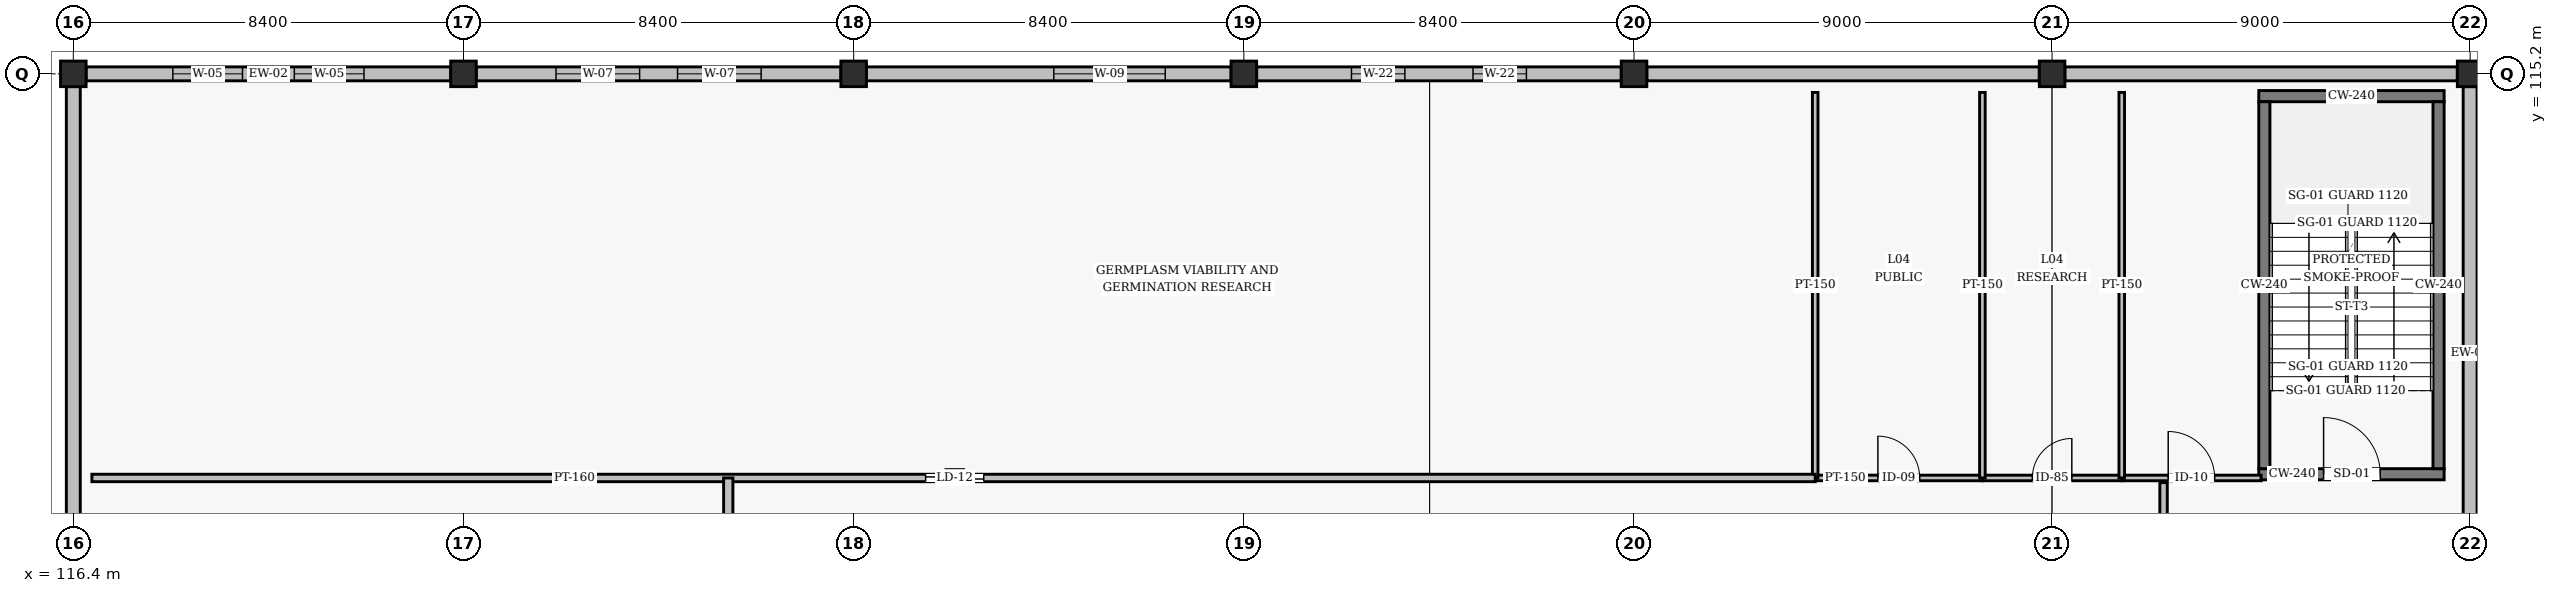
"""IFC4 building model, lengths in metres.
Left out: names, types, materials, properties, quantities, classifications, styles, units other than length and angle.
Written with IfcOpenShell. Run it as: python <this file> out.ifc"""

import sys

from ifc_helpers import new_model, si_unit, direction, frame, frame_2d, origin, origin_2d, place, context, subcontext, project, spatial, rectangle, hollow_rectangle, extrude, element, fill, save


model = new_model("IFC4")
c1 = context("Model", 3, precision=1e-05, world=origin(), true_north=direction((0.0, 1.0)))
c2 = subcontext(c1, "Body", "Model", "MODEL_VIEW")
j1 = project(units=[si_unit("LENGTHUNIT", "METRE"), si_unit("PLANEANGLEUNIT", "RADIAN")], contexts=[c1])
p1 = place(None, origin())
s1 = spatial("IfcSite", under=j1, at=p1, CompositionType="ELEMENT")
p2 = place(p1, origin())
s2 = spatial("IfcBuilding", under=s1, at=p2, CompositionType="ELEMENT")
p3 = place(p2, frame((0.0, 0.0, 17.1)))
s3 = spatial("IfcBuildingStorey", under=s2, at=p3, CompositionType="ELEMENT", Elevation=17.1)
p4 = place(p3, frame((116.4, 115.2, 0.0), z_axis=(0.0, 0.0, 1.0), x_axis=(1.0, 0.0, 0.0)))
e1 = element("IfcColumn", 1, at=p4, inside=s3, PredefinedType="COLUMN", context=c2, shape_type="SweptSolid", body=[
    extrude(hollow_rectangle(XDim=0.55, YDim=0.55, WallThickness=0.022, InnerFilletRadius=0.022, OuterFilletRadius=0.044, at=origin_2d()), origin(), (0.0, 0.0, 1.0), 3.876),
])
for number, where, z_axis, x_axis in (
    (2, (124.8, 115.2, 0.0), (0.0, 0.0, 1.0), (1.0, 0.0, 0.0)),
    (3, (133.2, 115.2, 0.0), (0.0, 0.0, 1.0), (1.0, 0.0, 0.0)),
    (4, (141.6, 115.2, 0.0), (0.0, 0.0, 1.0), (1.0, 0.0, 0.0)),
    (5, (150.0, 115.2, 0.0), (0.0, 0.0, 1.0), (1.0, 0.0, 0.0)),
    (6, (159.0, 115.2, 0.0), (0.0, 0.0, 1.0), (1.0, 0.0, 0.0)),
    (7, (168.0, 115.2, 0.0), (0.0, 0.0, 1.0), (1.0, 0.0, 0.0)),
):
    element("IfcColumn", number, at=place(p3, frame(where, z_axis=z_axis, x_axis=x_axis)), inside=s3, PredefinedType="COLUMN", context=c2, shape_type="SweptSolid", body=[
        extrude(hollow_rectangle(XDim=0.55, YDim=0.55, WallThickness=0.022, InnerFilletRadius=0.022, OuterFilletRadius=0.044, at=origin_2d()), origin(), (0.0, 0.0, 1.0), 3.9),
    ])
p5 = place(p3, frame((168.0, 103.475, 0.0), z_axis=(0.0, 0.0, 1.0), x_axis=(0.0, 1.0, 0.0)))
e8 = element("IfcWall", 8, at=p5, inside=s3, PredefinedType="SOLIDWALL", context=c2, shape_type="SweptSolid", body=[
    extrude(rectangle(XDim=11.45, YDim=0.3, at=frame_2d((5.725, 0.0))), origin(), (0.0, 0.0, 1.0), 2.808),
])
for number, where, z_axis, x_axis in (
    (9, (167.725, 115.2, 0.0), (0.0, 0.0, 1.0), (-1.0, 0.0, 0.0)),
    (10, (158.725, 115.2, 0.0), (0.0, 0.0, 1.0), (-1.0, 0.0, 0.0)),
):
    element("IfcWall", number, at=place(p3, frame(where, z_axis=z_axis, x_axis=x_axis)), inside=s3, PredefinedType="SOLIDWALL", context=c2, shape_type="SweptSolid", body=[
        extrude(rectangle(XDim=8.45, YDim=0.3, at=frame_2d((4.225, 0.0))), origin(), (0.0, 0.0, 1.0), 2.808),
    ])
p6 = place(p3, frame((149.725, 115.2, 0.0), z_axis=(0.0, 0.0, 1.0), x_axis=(-1.0, 0.0, 0.0)))
e11 = element("IfcWall", 11, at=p6, inside=s3, PredefinedType="SOLIDWALL", context=c2, shape_type="SweptSolid", body=[
    extrude(rectangle(XDim=7.85, YDim=0.3, at=frame_2d((3.925, 0.0))), origin(), (0.0, 0.0, 1.0), 3.1),
])
p7 = place(p6, frame((2.042, 0.0, 0.9)))
e12 = element("IfcOpeningElement", 12, at=p7, cuts=e11, PredefinedType="OPENING", context=c2, shape_type="SweptSolid", body=[
    extrude(rectangle(XDim=1.15, YDim=1.9, at=frame_2d((0.575, 0.95))), frame((0.0, 0.16, 0.0), z_axis=(0.0, -1.0, 0.0), x_axis=(1.0, 0.0, 0.0)), (0.0, 0.0, 1.0), 0.32),
])
p8 = place(p6, frame((4.658, 0.0, 0.9)))
e13 = element("IfcOpeningElement", 13, at=p8, cuts=e11, PredefinedType="OPENING", context=c2, shape_type="SweptSolid", body=[
    extrude(rectangle(XDim=1.15, YDim=1.9, at=frame_2d((0.575, 0.95))), frame((0.0, 0.16, 0.0), z_axis=(0.0, -1.0, 0.0), x_axis=(1.0, 0.0, 0.0)), (0.0, 0.0, 1.0), 0.32),
])
p9 = place(p3, frame((141.325, 115.2, 0.0), z_axis=(0.0, 0.0, 1.0), x_axis=(-1.0, 0.0, 0.0)))
e14 = element("IfcWall", 14, at=p9, inside=s3, PredefinedType="SOLIDWALL", context=c2, shape_type="SweptSolid", body=[
    extrude(rectangle(XDim=7.85, YDim=0.3, at=frame_2d((3.925, 0.0))), origin(), (0.0, 0.0, 1.0), 3.1),
])
p10 = place(p9, frame((1.417, 0.0, 0.85)))
e15 = element("IfcOpeningElement", 15, at=p10, cuts=e14, PredefinedType="OPENING", context=c2, shape_type="SweptSolid", body=[
    extrude(rectangle(XDim=2.4, YDim=1.95, at=frame_2d((1.2, 0.975))), frame((0.0, 0.16, 0.0), z_axis=(0.0, -1.0, 0.0), x_axis=(1.0, 0.0, 0.0)), (0.0, 0.0, 1.0), 0.32),
])
p11 = place(p3, frame((132.925, 115.2, 0.0), z_axis=(0.0, 0.0, 1.0), x_axis=(-1.0, 0.0, 0.0)))
e16 = element("IfcWall", 16, at=p11, inside=s3, PredefinedType="SOLIDWALL", context=c2, shape_type="SweptSolid", body=[
    extrude(rectangle(XDim=7.85, YDim=0.3, at=frame_2d((3.925, 0.0))), origin(), (0.0, 0.0, 1.0), 3.1),
])
p12 = place(p11, frame((1.717, 0.0, 0.85)))
e17 = element("IfcOpeningElement", 17, at=p12, cuts=e16, PredefinedType="OPENING", context=c2, shape_type="SweptSolid", body=[
    extrude(rectangle(XDim=1.8, YDim=1.95, at=frame_2d((0.9, 0.975))), frame((0.0, 0.16, 0.0), z_axis=(0.0, -1.0, 0.0), x_axis=(1.0, 0.0, 0.0)), (0.0, 0.0, 1.0), 0.32),
])
p13 = place(p11, frame((4.333, 0.0, 0.85)))
e18 = element("IfcOpeningElement", 18, at=p13, cuts=e16, PredefinedType="OPENING", context=c2, shape_type="SweptSolid", body=[
    extrude(rectangle(XDim=1.8, YDim=1.95, at=frame_2d((0.9, 0.975))), frame((0.0, 0.16, 0.0), z_axis=(0.0, -1.0, 0.0), x_axis=(1.0, 0.0, 0.0)), (0.0, 0.0, 1.0), 0.32),
])
p14 = place(p3, frame((124.525, 115.2, 0.0), z_axis=(0.0, 0.0, 1.0), x_axis=(-1.0, 0.0, 0.0)))
e19 = element("IfcWall", 19, at=p14, inside=s3, PredefinedType="SOLIDWALL", context=c2, shape_type="SweptSolid", body=[
    extrude(rectangle(XDim=7.85, YDim=0.3, at=frame_2d((3.925, 0.0))), origin(), (0.0, 0.0, 1.0), 3.1),
])
p15 = place(p14, frame((1.867, 0.0, 0.85)))
e20 = element("IfcOpeningElement", 20, at=p15, cuts=e19, PredefinedType="OPENING", context=c2, shape_type="SweptSolid", body=[
    extrude(rectangle(XDim=1.5, YDim=1.95, at=frame_2d((0.75, 0.975))), frame((0.0, 0.16, 0.0), z_axis=(0.0, -1.0, 0.0), x_axis=(1.0, 0.0, 0.0)), (0.0, 0.0, 1.0), 0.32),
])
p16 = place(p14, frame((4.483, 0.0, 0.85)))
e21 = element("IfcOpeningElement", 21, at=p16, cuts=e19, PredefinedType="OPENING", context=c2, shape_type="SweptSolid", body=[
    extrude(rectangle(XDim=1.5, YDim=1.95, at=frame_2d((0.75, 0.975))), frame((0.0, 0.16, 0.0), z_axis=(0.0, -1.0, 0.0), x_axis=(1.0, 0.0, 0.0)), (0.0, 0.0, 1.0), 0.32),
])
p17 = place(p3, frame((116.4, 114.925, 0.0), z_axis=(0.0, 0.0, 1.0), x_axis=(0.0, -1.0, 0.0)))
e22 = element("IfcWall", 22, at=p17, inside=s3, PredefinedType="SOLIDWALL", context=c2, shape_type="SweptSolid", body=[
    extrude(rectangle(XDim=11.45, YDim=0.3, at=frame_2d((5.725, 0.0))), origin(), (0.0, 0.0, 1.0), 2.843),
])
p18 = place(p3, frame((163.45, 106.58, 0.0), z_axis=(0.0, 0.0, 1.0), x_axis=(1.0, 0.0, 0.0)))
e23 = element("IfcWall", 23, at=p18, inside=s3, PredefinedType="SHEAR", context=c2, shape_type="SweptSolid", body=[
    extrude(rectangle(XDim=3.99, YDim=0.24, at=frame_2d((1.995, 0.0))), origin(), (0.0, 0.0, 1.0), 3.6),
])
p19 = place(p18, frame((1.395, 0.0, 0.0)))
e24 = element("IfcOpeningElement", 24, at=p19, cuts=e23, PredefinedType="OPENING", context=c2, shape_type="SweptSolid", body=[
    extrude(rectangle(XDim=1.22, YDim=2.18, at=frame_2d((0.61, 1.09))), frame((0.0, 0.13, 0.0), z_axis=(0.0, -1.0, 0.0), x_axis=(1.0, 0.0, 0.0)), (0.0, 0.0, 1.0), 0.26),
])
p20 = place(p3, frame((163.45, 114.72, 0.0), z_axis=(0.0, 0.0, 1.0), x_axis=(1.0, 0.0, 0.0)))
e25 = element("IfcWall", 25, at=p20, inside=s3, PredefinedType="SHEAR", context=c2, shape_type="SweptSolid", body=[
    extrude(rectangle(XDim=3.99, YDim=0.24, at=frame_2d((1.995, 0.0))), origin(), (0.0, 0.0, 1.0), 3.6),
])
for number, where, z_axis, x_axis in (
    (26, (163.57, 106.7, 0.0), (0.0, 0.0, 1.0), (0.0, 1.0, 0.0)),
    (27, (167.32, 106.7, 0.0), (0.0, 0.0, 1.0), (0.0, 1.0, 0.0)),
):
    element("IfcWall", number, at=place(p3, frame(where, z_axis=z_axis, x_axis=x_axis)), inside=s3, PredefinedType="SHEAR", context=c2, shape_type="SweptSolid", body=[
        extrude(rectangle(XDim=7.9, YDim=0.24, at=frame_2d((3.95, 0.0))), origin(), (0.0, 0.0, 1.0), 3.6),
    ])
p21 = place(p3, frame((153.9, 106.5, 0.0), z_axis=(0.0, 0.0, 1.0), x_axis=(1.0, 0.0, 0.0)))
e28 = element("IfcWall", 28, at=p21, inside=s3, PredefinedType="PARTITIONING", context=c2, shape_type="SweptSolid", body=[
    extrude(rectangle(XDim=3.6, YDim=0.12, at=frame_2d((1.8, 0.0))), origin(), (0.0, 0.0, 1.0), 3.6),
])
p22 = place(p21, frame((1.35, 0.0, 0.0)))
e29 = element("IfcOpeningElement", 29, at=p22, cuts=e28, PredefinedType="OPENING", context=c2, shape_type="SweptSolid", body=[
    extrude(rectangle(XDim=0.9, YDim=2.1, at=frame_2d((0.45, 1.05))), frame((0.0, 0.07, 0.0), z_axis=(0.0, -1.0, 0.0), x_axis=(1.0, 0.0, 0.0)), (0.0, 0.0, 1.0), 0.14),
])
p23 = place(p3, frame((157.5, 106.5, 0.0), z_axis=(0.0, 0.0, 1.0), x_axis=(1.0, 0.0, 0.0)))
e30 = element("IfcWall", 30, at=p23, inside=s3, PredefinedType="PARTITIONING", context=c2, shape_type="SweptSolid", body=[
    extrude(rectangle(XDim=3.0, YDim=0.12, at=frame_2d((1.5, 0.0))), origin(), (0.0, 0.0, 1.0), 2.85),
])
p24 = place(p23, frame((1.075, 0.0, 0.0)))
e31 = element("IfcOpeningElement", 31, at=p24, cuts=e30, PredefinedType="OPENING", context=c2, shape_type="SweptSolid", body=[
    extrude(rectangle(XDim=0.85, YDim=2.1, at=frame_2d((0.425, 1.05))), frame((0.0, 0.07, 0.0), z_axis=(0.0, -1.0, 0.0), x_axis=(1.0, 0.0, 0.0)), (0.0, 0.0, 1.0), 0.14),
])
p25 = place(p3, frame((160.5, 106.5, 0.0), z_axis=(0.0, 0.0, 1.0), x_axis=(1.0, 0.0, 0.0)))
e32 = element("IfcWall", 32, at=p25, inside=s3, PredefinedType="PARTITIONING", context=c2, shape_type="SweptSolid", body=[
    extrude(rectangle(XDim=3.0, YDim=0.12, at=frame_2d((1.5, 0.0))), origin(), (0.0, 0.0, 1.0), 3.6),
])
p26 = place(p25, frame((1.0, 0.0, 0.0)))
e33 = element("IfcOpeningElement", 33, at=p26, cuts=e32, PredefinedType="OPENING", context=c2, shape_type="SweptSolid", body=[
    extrude(rectangle(XDim=1.0, YDim=2.1, at=frame_2d((0.5, 1.05))), frame((0.0, 0.07, 0.0), z_axis=(0.0, -1.0, 0.0), x_axis=(1.0, 0.0, 0.0)), (0.0, 0.0, 1.0), 0.14),
])
for number, where, z_axis, x_axis in (
    (34, (153.9, 106.5, 0.0), (0.0, 0.0, 1.0), (0.0, 1.0, 0.0)),
    (35, (157.5, 106.5, 0.0), (0.0, 0.0, 1.0), (0.0, 1.0, 0.0)),
):
    element("IfcWall", number, at=place(p3, frame(where, z_axis=z_axis, x_axis=x_axis)), inside=s3, PredefinedType="PARTITIONING", context=c2, shape_type="SweptSolid", body=[
        extrude(rectangle(XDim=8.3, YDim=0.12, at=frame_2d((4.15, 0.0))), origin(), (0.0, 0.0, 1.0), 3.2),
    ])
p27 = place(p3, frame((160.5, 106.5, 0.0), z_axis=(0.0, 0.0, 1.0), x_axis=(0.0, 1.0, 0.0)))
e36 = element("IfcWall", 36, at=p27, inside=s3, PredefinedType="PARTITIONING", context=c2, shape_type="SweptSolid", body=[
    extrude(rectangle(XDim=8.3, YDim=0.12, at=frame_2d((4.15, 0.0))), origin(), (0.0, 0.0, 1.0), 3.6),
])
p28 = place(p3, frame((161.4, 92.3, 0.0), z_axis=(0.0, 0.0, 1.0), x_axis=(0.0, 1.0, 0.0)))
e37 = element("IfcWall", 37, at=p28, inside=s3, PredefinedType="PARTITIONING", context=c2, shape_type="SweptSolid", body=[
    extrude(rectangle(XDim=14.1, YDim=0.16, at=frame_2d((7.05, 0.0))), origin(), (0.0, 0.0, 1.0), 2.95),
])
p29 = place(p28, frame((6.5, 0.0, 0.0)))
e38 = element("IfcOpeningElement", 38, at=p29, cuts=e37, PredefinedType="OPENING", context=c2, shape_type="SweptSolid", body=[
    extrude(rectangle(XDim=1.08, YDim=2.08, at=frame_2d((0.54, 1.04))), frame((0.0, 0.09, 0.0), z_axis=(0.0, -1.0, 0.0), x_axis=(1.0, 0.0, 0.0)), (0.0, 0.0, 1.0), 0.18),
])
p30 = place(p3, frame((116.8, 106.5, 0.0), z_axis=(0.0, 0.0, 1.0), x_axis=(1.0, 0.0, 0.0)))
e39 = element("IfcWall", 39, at=p30, inside=s3, PredefinedType="PARTITIONING", context=c2, shape_type="SweptSolid", body=[
    extrude(rectangle(XDim=37.1, YDim=0.16, at=frame_2d((18.55, 0.0))), origin(), (0.0, 0.0, 1.0), 2.85),
])
p31 = place(p30, frame((17.95, 0.0, 0.0)))
e40 = element("IfcOpeningElement", 40, at=p31, cuts=e39, PredefinedType="OPENING", context=c2, shape_type="SweptSolid", body=[
    extrude(rectangle(XDim=1.25, YDim=2.12, at=frame_2d((0.625, 1.06))), frame((0.0, 0.09, 0.0), z_axis=(0.0, -1.0, 0.0), x_axis=(1.0, 0.0, 0.0)), (0.0, 0.0, 1.0), 0.18),
])
p32 = place(p3, frame((130.5, 92.3, 0.0), z_axis=(0.0, 0.0, 1.0), x_axis=(0.0, 1.0, 0.0)))
e41 = element("IfcWall", 41, at=p32, inside=s3, PredefinedType="SOLIDWALL", context=c2, shape_type="SweptSolid", body=[
    extrude(rectangle(XDim=14.2, YDim=0.2, at=frame_2d((7.1, 0.0))), origin(), (0.0, 0.0, 1.0), 3.1),
])
p33 = place(p32, frame((6.5, 0.0, 0.0)))
e42 = element("IfcOpeningElement", 42, at=p33, cuts=e41, PredefinedType="OPENING", context=c2, shape_type="SweptSolid", body=[
    extrude(rectangle(XDim=1.18, YDim=2.15, at=frame_2d((0.59, 1.075))), frame((0.0, 0.11, 0.0), z_axis=(0.0, -1.0, 0.0), x_axis=(1.0, 0.0, 0.0)), (0.0, 0.0, 1.0), 0.22),
])
p34 = place(p7, origin())
e43 = element("IfcWindow", 43, at=p34, inside=s3, PartitioningType="SINGLE_PANEL", PredefinedType="WINDOW", context=c2, shape_type="SweptSolid", body=[
    extrude(rectangle(XDim=1.15, YDim=1.9, at=frame_2d((0.575, 0.95))), frame((0.0, 0.03, 0.0), z_axis=(0.0, -1.0, 0.0), x_axis=(1.0, 0.0, 0.0)), (0.0, 0.0, 1.0), 0.06),
])
fill(e12, e43)
p35 = place(p8, origin())
e44 = element("IfcWindow", 44, at=p35, inside=s3, PartitioningType="SINGLE_PANEL", PredefinedType="WINDOW", context=c2, shape_type="SweptSolid", body=[
    extrude(rectangle(XDim=1.15, YDim=1.9, at=frame_2d((0.575, 0.95))), frame((0.0, 0.03, 0.0), z_axis=(0.0, -1.0, 0.0), x_axis=(1.0, 0.0, 0.0)), (0.0, 0.0, 1.0), 0.06),
])
fill(e13, e44)
p36 = place(p10, origin())
e45 = element("IfcWindow", 45, at=p36, inside=s3, PartitioningType="SINGLE_PANEL", PredefinedType="WINDOW", context=c2, shape_type="SweptSolid", body=[
    extrude(rectangle(XDim=2.4, YDim=1.95, at=frame_2d((1.2, 0.975))), frame((0.0, 0.03, 0.0), z_axis=(0.0, -1.0, 0.0), x_axis=(1.0, 0.0, 0.0)), (0.0, 0.0, 1.0), 0.06),
])
fill(e15, e45)
p37 = place(p12, origin())
e46 = element("IfcWindow", 46, at=p37, inside=s3, PartitioningType="SINGLE_PANEL", PredefinedType="WINDOW", context=c2, shape_type="SweptSolid", body=[
    extrude(rectangle(XDim=1.8, YDim=1.95, at=frame_2d((0.9, 0.975))), frame((0.0, 0.03, 0.0), z_axis=(0.0, -1.0, 0.0), x_axis=(1.0, 0.0, 0.0)), (0.0, 0.0, 1.0), 0.06),
])
fill(e17, e46)
p38 = place(p13, origin())
e47 = element("IfcWindow", 47, at=p38, inside=s3, PartitioningType="SINGLE_PANEL", PredefinedType="WINDOW", context=c2, shape_type="SweptSolid", body=[
    extrude(rectangle(XDim=1.8, YDim=1.95, at=frame_2d((0.9, 0.975))), frame((0.0, 0.03, 0.0), z_axis=(0.0, -1.0, 0.0), x_axis=(1.0, 0.0, 0.0)), (0.0, 0.0, 1.0), 0.06),
])
fill(e18, e47)
p39 = place(p15, origin())
e48 = element("IfcWindow", 48, at=p39, inside=s3, PartitioningType="SINGLE_PANEL", PredefinedType="WINDOW", context=c2, shape_type="SweptSolid", body=[
    extrude(rectangle(XDim=1.5, YDim=1.95, at=frame_2d((0.75, 0.975))), frame((0.0, 0.03, 0.0), z_axis=(0.0, -1.0, 0.0), x_axis=(1.0, 0.0, 0.0)), (0.0, 0.0, 1.0), 0.06),
])
fill(e20, e48)
p40 = place(p16, origin())
e49 = element("IfcWindow", 49, at=p40, inside=s3, PartitioningType="SINGLE_PANEL", PredefinedType="WINDOW", context=c2, shape_type="SweptSolid", body=[
    extrude(rectangle(XDim=1.5, YDim=1.95, at=frame_2d((0.75, 0.975))), frame((0.0, 0.03, 0.0), z_axis=(0.0, -1.0, 0.0), x_axis=(1.0, 0.0, 0.0)), (0.0, 0.0, 1.0), 0.06),
])
fill(e21, e49)
p41 = place(p19, origin())
e50 = element("IfcDoor", 50, at=p41, inside=s3, OperationType="SINGLE_SWING_LEFT", PredefinedType="DOOR", context=c2, shape_type="SweptSolid", body=[
    extrude(rectangle(XDim=1.22, YDim=2.18, at=frame_2d((0.61, 1.09))), frame((0.0, 0.025, 0.0), z_axis=(0.0, -1.0, 0.0), x_axis=(1.0, 0.0, 0.0)), (0.0, 0.0, 1.0), 0.05),
])
fill(e24, e50)
p42 = place(p22, origin())
e51 = element("IfcDoor", 51, at=p42, inside=s3, OperationType="SINGLE_SWING_LEFT", PredefinedType="DOOR", context=c2, shape_type="SweptSolid", body=[
    extrude(rectangle(XDim=0.9, YDim=2.1, at=frame_2d((0.45, 1.05))), frame((0.0, 0.025, 0.0), z_axis=(0.0, -1.0, 0.0), x_axis=(1.0, 0.0, 0.0)), (0.0, 0.0, 1.0), 0.05),
])
fill(e29, e51)
p43 = place(p24, origin())
e52 = element("IfcDoor", 52, at=p43, inside=s3, OperationType="SINGLE_SWING_RIGHT", PredefinedType="DOOR", context=c2, shape_type="SweptSolid", body=[
    extrude(rectangle(XDim=0.85, YDim=2.1, at=frame_2d((0.425, 1.05))), frame((0.0, 0.025, 0.0), z_axis=(0.0, -1.0, 0.0), x_axis=(1.0, 0.0, 0.0)), (0.0, 0.0, 1.0), 0.05),
])
fill(e31, e52)
p44 = place(p26, origin())
e53 = element("IfcDoor", 53, at=p44, inside=s3, OperationType="SINGLE_SWING_LEFT", PredefinedType="DOOR", context=c2, shape_type="SweptSolid", body=[
    extrude(rectangle(XDim=1.0, YDim=2.1, at=frame_2d((0.5, 1.05))), frame((0.0, 0.025, 0.0), z_axis=(0.0, -1.0, 0.0), x_axis=(1.0, 0.0, 0.0)), (0.0, 0.0, 1.0), 0.05),
])
fill(e33, e53)
p45 = place(p31, origin())
e54 = element("IfcDoor", 54, at=p45, inside=s3, OperationType="SINGLE_SWING_LEFT", PredefinedType="DOOR", context=c2, shape_type="SweptSolid", body=[
    extrude(rectangle(XDim=1.25, YDim=2.12, at=frame_2d((0.625, 1.06))), frame((0.0, 0.025, 0.0), z_axis=(0.0, -1.0, 0.0), x_axis=(1.0, 0.0, 0.0)), (0.0, 0.0, 1.0), 0.05),
])
fill(e40, e54)
save(model, sys.argv[1])
